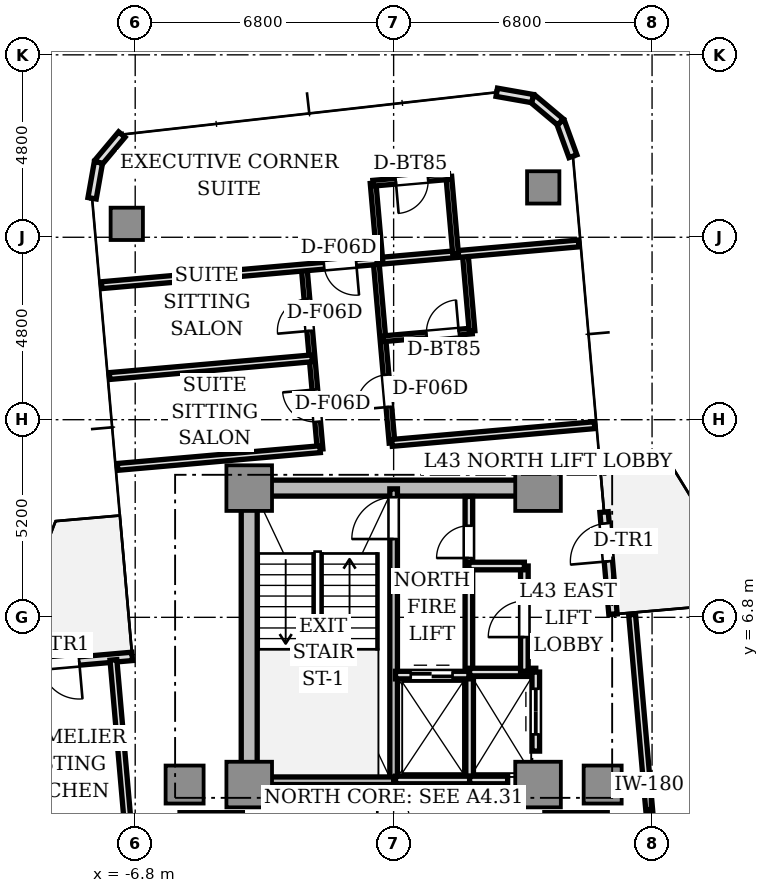
"""IFC4 building model, lengths in metres.
Left out: names, types, materials, properties, quantities, classifications, styles, units other than length and angle.
Written with IfcOpenShell. Run it as: python <this file> out.ifc"""

import sys

from ifc_helpers import new_model, si_unit, direction, frame, frame_2d, origin, origin_2d, place, context, subcontext, project, spatial, rectangle, extrude, source, transform, mapped, element, fill, save


model = new_model("IFC4")
c1 = context("Model", 3, precision=1e-05, world=origin(), true_north=direction((0.0, 1.0)))
c2 = subcontext(c1, "Body", "Model", "MODEL_VIEW")
j1 = project(units=[si_unit("LENGTHUNIT", "METRE"), si_unit("PLANEANGLEUNIT", "RADIAN")], contexts=[c1])
p1 = place(None, origin())
s1 = spatial("IfcSite", under=j1, at=p1, CompositionType="ELEMENT")
p2 = place(p1, origin())
s2 = spatial("IfcBuilding", under=s1, at=p2, CompositionType="ELEMENT")
p3 = place(p2, frame((0.0, 0.0, 157.3)))
s3 = spatial("IfcBuildingStorey", under=s2, at=p3, CompositionType="ELEMENT", Elevation=157.3)
p4 = place(p3, frame((-3.55, 10.2, 0.0), z_axis=(0.0, 0.0, 1.0), x_axis=(1.0, 0.0, 0.0)))
e1 = element("IfcWall", 1, at=p4, inside=s3, PredefinedType="SHEAR", context=c2, shape_type="SweptSolid", body=[
    extrude(rectangle(XDim=7.1, YDim=0.42, at=frame_2d((3.55, 0.0))), origin(), (0.0, 0.0, 1.0), 3.11),
])
p5 = place(p3, frame((-3.8, 2.85, 0.0), z_axis=(0.0, 0.0, 1.0), x_axis=(0.0, 1.0, 0.0)))
e2 = element("IfcWall", 2, at=p5, inside=s3, PredefinedType="SHEAR", context=c2, shape_type="SweptSolid", body=[
    extrude(rectangle(XDim=6.9, YDim=0.42, at=frame_2d((3.45, 0.0))), origin(), (0.0, 0.0, 1.0), 3.11),
])
m1 = source(origin(), c2, "Body", "SweptSolid", [
    extrude(rectangle(XDim=1.2, YDim=1.2, at=origin_2d()), origin(), (0.0, 0.0, 1.0), 3.11),
])
for number, where, z_axis, x_axis in (
    (3, (-3.8, 2.4, 0.0), (0.0, 0.0, 1.0), (1.0, 0.0, 0.0)),
    (4, (3.8, 2.4, 0.0), (0.0, 0.0, 1.0), (1.0, 0.0, 0.0)),
    (5, (-3.8, 10.2, 0.0), (0.0, 0.0, 1.0), (1.0, 0.0, 0.0)),
    (6, (3.8, 10.2, 0.0), (0.0, 0.0, 1.0), (1.0, 0.0, 0.0)),
):
    element("IfcColumn", number, at=place(p3, frame(where, z_axis=z_axis, x_axis=x_axis)), inside=s3, PredefinedType="COLUMN", context=c2, shape_type="MappedRepresentation", body=[
        mapped(m1, transform((0.0, 0.0, 0.0), scale=1.0)),
    ])
m2 = source(origin(), c2, "Body", "SweptSolid", [
    extrude(rectangle(XDim=1.0, YDim=1.0, at=origin_2d()), origin(), (0.0, 0.0, 1.0), 3.11),
])
for number, where, z_axis, x_axis in (
    (7, (5.5, 2.4, 0.0), (0.0, 0.0, 1.0), (1.0, 0.0, 0.0)),
    (8, (-5.5, 2.4, 0.0), (0.0, 0.0, 1.0), (1.0, 0.0, 0.0)),
):
    element("IfcColumn", number, at=place(p3, frame(where, z_axis=z_axis, x_axis=x_axis)), inside=s3, PredefinedType="COLUMN", context=c2, shape_type="MappedRepresentation", body=[
        mapped(m2, transform((0.0, 0.0, 0.0), scale=1.0)),
    ])
m3 = source(origin(), c2, "Body", "SweptSolid", [
    extrude(rectangle(XDim=0.85, YDim=0.85, at=origin_2d()), origin(), (0.0, 0.0, 1.0), 3.11),
])
for number, where, z_axis, x_axis in (
    (9, (3.936, 18.112, 0.0), (0.0, 0.0, 1.0), (1.0, 0.0, 0.0)),
    (10, (-7.022, 17.153, 0.0), (0.0, 0.0, 1.0), (1.0, 0.0, 0.0)),
):
    element("IfcColumn", number, at=place(p3, frame(where, z_axis=z_axis, x_axis=x_axis)), inside=s3, PredefinedType="COLUMN", context=c2, shape_type="MappedRepresentation", body=[
        mapped(m3, transform((0.0, 0.0, 0.0), scale=1.0)),
    ])
p6 = place(p3, frame((5.772, 6.879, 0.0), z_axis=(0.0, 0.0, 1.0), x_axis=(-0.087168071984, 0.996193619346, 0.0)))
e11 = element("IfcWall", 11, at=p6, inside=s3, PredefinedType="STANDARD", context=c2, shape_type="SweptSolid", body=[
    extrude(rectangle(XDim=2.7, YDim=0.22, at=frame_2d((1.35, 0.0))), origin(), (0.0, 0.0, 1.0), 3.11),
])
p7 = place(p6, frame((1.4, 0.0, 0.0)))
e12 = element("IfcOpeningElement", 12, at=p7, cuts=e11, PredefinedType="OPENING", context=c2, shape_type="SweptSolid", body=[
    extrude(rectangle(XDim=1.0, YDim=2.2, at=frame_2d((0.5, 1.1))), frame((0.0, 0.12, 0.0), z_axis=(0.0, -1.0, 0.0), x_axis=(1.0, 0.0, 0.0)), (0.0, 0.0, 1.0), 0.24),
])
p8 = place(p3, frame((4.718, 18.933, 0.0), z_axis=(0.0, 0.0, 1.0), x_axis=(-0.34188635151, 0.939741306239, 0.0)))
e13 = element("IfcWall", 13, at=p8, inside=s3, PredefinedType="STANDARD", context=c2, shape_type="SweptSolid", body=[
    extrude(rectangle(XDim=0.958, YDim=0.22, at=frame_2d((0.479, 0.0))), origin(), (0.0, 0.0, 1.0), 3.11),
])
for number, where, z_axis, x_axis in (
    (14, (4.39, 19.833, 0.0), (0.0, 0.0, 1.0), (-0.766, 0.643, 0.0)),
    (15, (3.657, 20.449, 0.0), (0.0, 0.0, 1.0), (-0.985, 0.174, 0.0)),
):
    element("IfcWall", number, at=place(p3, frame(where, z_axis=z_axis, x_axis=x_axis)), inside=s3, PredefinedType="STANDARD", context=c2, shape_type="SweptSolid", body=[
        extrude(rectangle(XDim=0.958, YDim=0.22, at=frame_2d((0.479, 0.0))), origin(), (0.0, 0.0, 1.0), 3.11),
    ])
for number, where, z_axis, x_axis in (
    (16, (-7.152, 19.503, 0.0), (0.0, 0.0, 1.0), (-0.643, -0.766, 0.0)),
    (17, (-7.768, 18.769, 0.0), (0.0, 0.0, 1.0), (-0.174, -0.985, 0.0)),
):
    element("IfcWall", number, at=place(p3, frame(where, z_axis=z_axis, x_axis=x_axis)), inside=s3, PredefinedType="STANDARD", context=c2, shape_type="SweptSolid", body=[
        extrude(rectangle(XDim=0.958, YDim=0.22, at=frame_2d((0.479, 0.0))), origin(), (0.0, 0.0, 1.0), 3.11),
    ])
p9 = place(p3, frame((-6.879, 5.772, 0.0), z_axis=(0.0, 0.0, 1.0), x_axis=(-0.996193619346, -0.087168071984, 0.0)))
e18 = element("IfcWall", 18, at=p9, inside=s3, PredefinedType="STANDARD", context=c2, shape_type="SweptSolid", body=[
    extrude(rectangle(XDim=2.7, YDim=0.22, at=frame_2d((1.35, 0.0))), origin(), (0.0, 0.0, 1.0), 3.11),
])
p10 = place(p9, frame((1.4, 0.0, 0.0)))
e19 = element("IfcOpeningElement", 19, at=p10, cuts=e18, PredefinedType="OPENING", context=c2, shape_type="SweptSolid", body=[
    extrude(rectangle(XDim=1.0, YDim=2.2, at=frame_2d((0.5, 1.1))), frame((0.0, 0.12, 0.0), z_axis=(0.0, -1.0, 0.0), x_axis=(1.0, 0.0, 0.0)), (0.0, 0.0, 1.0), 0.24),
])
p11 = place(p3, frame((0.0, 2.5, 0.0), z_axis=(0.0, 0.0, 1.0), x_axis=(0.0, 1.0, 0.0)))
e20 = element("IfcWall", 20, at=p11, inside=s3, PredefinedType="SOLIDWALL", context=c2, shape_type="SweptSolid", body=[
    extrude(rectangle(XDim=7.68, YDim=0.2, at=frame_2d((3.84, 0.0))), origin(), (0.0, 0.0, 1.0), 3.11),
])
p12 = place(p11, frame((6.36, 0.0, 0.0)))
e21 = element("IfcOpeningElement", 21, at=p12, cuts=e20, PredefinedType="OPENING", context=c2, shape_type="SweptSolid", body=[
    extrude(rectangle(XDim=1.1, YDim=2.15, at=frame_2d((0.55, 1.075))), frame((0.0, 0.11, 0.0), z_axis=(0.0, -1.0, 0.0), x_axis=(1.0, 0.0, 0.0)), (0.0, 0.0, 1.0), 0.22),
])
p13 = place(p3, frame((-3.72, 2.5, 0.0), z_axis=(0.0, 0.0, 1.0), x_axis=(1.0, 0.0, 0.0)))
e22 = element("IfcWall", 22, at=p13, inside=s3, PredefinedType="SOLIDWALL", context=c2, shape_type="SweptSolid", body=[
    extrude(rectangle(XDim=3.72, YDim=0.2, at=frame_2d((1.86, 0.0))), origin(), (0.0, 0.0, 1.0), 3.11),
])
p14 = place(p3, frame((1.98, 5.32, 0.0), z_axis=(0.0, 0.0, 1.0), x_axis=(0.0, 1.0, 0.0)))
e23 = element("IfcWall", 23, at=p14, inside=s3, PredefinedType="SOLIDWALL", context=c2, shape_type="SweptSolid", body=[
    extrude(rectangle(XDim=4.66, YDim=0.2, at=frame_2d((2.33, 0.0))), origin(), (0.0, 0.0, 1.0), 2.66),
])
p15 = place(p14, frame((3.04, 0.0, 0.0)))
e24 = element("IfcOpeningElement", 24, at=p15, cuts=e23, PredefinedType="OPENING", context=c2, shape_type="SweptSolid", body=[
    extrude(rectangle(XDim=0.85, YDim=2.1, at=frame_2d((0.425, 1.05))), frame((0.0, 0.11, 0.0), z_axis=(0.0, -1.0, 0.0), x_axis=(1.0, 0.0, 0.0)), (0.0, 0.0, 1.0), 0.22),
])
p16 = place(p3, frame((2.0, 2.5, 0.0), z_axis=(0.0, 0.0, 1.0), x_axis=(0.0, 1.0, 0.0)))
e25 = element("IfcWall", 25, at=p16, inside=s3, PredefinedType="SOLIDWALL", context=c2, shape_type="SweptSolid", body=[
    extrude(rectangle(XDim=2.78, YDim=0.2, at=frame_2d((1.39, 0.0))), origin(), (0.0, 0.0, 1.0), 2.66),
])
p17 = place(p3, frame((0.05, 2.52, 0.0), z_axis=(0.0, 0.0, 1.0), x_axis=(1.0, 0.0, 0.0)))
e26 = element("IfcWall", 26, at=p17, inside=s3, PredefinedType="SOLIDWALL", context=c2, shape_type="SweptSolid", body=[
    extrude(rectangle(XDim=1.95, YDim=0.2, at=frame_2d((0.975, 0.0))), origin(), (0.0, 0.0, 1.0), 2.66),
])
p18 = place(p3, frame((0.05, 5.28, 0.0), z_axis=(0.0, 0.0, 1.0), x_axis=(1.0, 0.0, 0.0)))
e27 = element("IfcWall", 27, at=p18, inside=s3, PredefinedType="SOLIDWALL", context=c2, shape_type="SweptSolid", body=[
    extrude(rectangle(XDim=1.93, YDim=0.2, at=frame_2d((0.965, 0.0))), origin(), (0.0, 0.0, 1.0), 2.66),
])
p19 = place(p18, frame((0.4, 0.0, 0.0)))
e28 = element("IfcOpeningElement", 28, at=p19, cuts=e27, PredefinedType="OPENING", context=c2, shape_type="SweptSolid", body=[
    extrude(rectangle(XDim=1.1, YDim=2.2, at=frame_2d((0.55, 1.1))), frame((0.0, 0.11, 0.0), z_axis=(0.0, -1.0, 0.0), x_axis=(1.0, 0.0, 0.0)), (0.0, 0.0, 1.0), 0.22),
])
p20 = place(p3, frame((2.0, 2.52, 0.0), z_axis=(0.0, 0.0, 1.0), x_axis=(1.0, 0.0, 0.0)))
e29 = element("IfcWall", 29, at=p20, inside=s3, PredefinedType="SOLIDWALL", context=c2, shape_type="SweptSolid", body=[
    extrude(rectangle(XDim=1.0, YDim=0.2, at=frame_2d((0.5, 0.0))), origin(), (0.0, 0.0, 1.0), 2.66),
])
p21 = place(p3, frame((2.0, 5.36, 0.0), z_axis=(0.0, 0.0, 1.0), x_axis=(1.0, 0.0, 0.0)))
e30 = element("IfcWall", 30, at=p21, inside=s3, PredefinedType="SOLIDWALL", context=c2, shape_type="SweptSolid", body=[
    extrude(rectangle(XDim=1.74, YDim=0.2, at=frame_2d((0.87, 0.0))), origin(), (0.0, 0.0, 1.0), 2.66),
])
p22 = place(p3, frame((3.74, 3.28, 0.0), z_axis=(0.0, 0.0, 1.0), x_axis=(0.0, 1.0, 0.0)))
e31 = element("IfcWall", 31, at=p22, inside=s3, PredefinedType="SOLIDWALL", context=c2, shape_type="SweptSolid", body=[
    extrude(rectangle(XDim=2.08, YDim=0.2, at=frame_2d((1.04, 0.0))), origin(), (0.0, 0.0, 1.0), 2.66),
])
p23 = place(p22, frame((0.44, 0.0, 0.0)))
e32 = element("IfcOpeningElement", 32, at=p23, cuts=e31, PredefinedType="OPENING", context=c2, shape_type="SweptSolid", body=[
    extrude(rectangle(XDim=1.2, YDim=2.2, at=frame_2d((0.6, 1.1))), frame((0.0, 0.11, 0.0), z_axis=(0.0, -1.0, 0.0), x_axis=(1.0, 0.0, 0.0)), (0.0, 0.0, 1.0), 0.22),
])
for number, where, z_axis, x_axis in (
    (33, (3.98, 1.56, 0.0), (0.0, 0.0, 1.0), (1.0, 0.0, 0.0)),
    (34, (-5.62, 1.56, 0.0), (0.0, 0.0, 1.0), (1.0, 0.0, 0.0)),
):
    element("IfcWall", number, at=place(p3, frame(where, z_axis=z_axis, x_axis=x_axis)), inside=s3, PredefinedType="SOLIDWALL", context=c2, shape_type="SweptSolid", body=[
        extrude(rectangle(XDim=1.64, YDim=0.2, at=frame_2d((0.82, 0.0))), origin(), (0.0, 0.0, 1.0), 2.66),
    ])
p24 = place(p3, frame((3.44, 5.38, 0.0), z_axis=(0.0, 0.0, 1.0), x_axis=(0.0, 1.0, 0.0)))
e35 = element("IfcWall", 35, at=p24, inside=s3, PredefinedType="SOLIDWALL", context=c2, shape_type="SweptSolid", body=[
    extrude(rectangle(XDim=2.77, YDim=0.2, at=frame_2d((1.385, 0.0))), origin(), (0.0, 0.0, 1.0), 2.66),
])
p25 = place(p24, frame((0.9, 0.0, 0.0)))
e36 = element("IfcOpeningElement", 36, at=p25, cuts=e35, PredefinedType="OPENING", context=c2, shape_type="SweptSolid", body=[
    extrude(rectangle(XDim=0.95, YDim=2.15, at=frame_2d((0.475, 1.075))), frame((0.0, 0.11, 0.0), z_axis=(0.0, -1.0, 0.0), x_axis=(1.0, 0.0, 0.0)), (0.0, 0.0, 1.0), 0.22),
])
p26 = place(p3, frame((1.98, 8.15, 0.0), z_axis=(0.0, 0.0, 1.0), x_axis=(1.0, 0.0, 0.0)))
e37 = element("IfcWall", 37, at=p26, inside=s3, PredefinedType="SOLIDWALL", context=c2, shape_type="SweptSolid", body=[
    extrude(rectangle(XDim=1.46, YDim=0.2, at=frame_2d((0.73, 0.0))), origin(), (0.0, 0.0, 1.0), 2.66),
])
p27 = place(p3, frame((7.181, -3.487, 0.0), z_axis=(0.0, 0.0, 1.0), x_axis=(-0.087163455754, 0.996194023261, 0.0)))
e38 = element("IfcWall", 38, at=p27, inside=s3, PredefinedType="PARTITIONING", context=c2, shape_type="SweptSolid", body=[
    extrude(rectangle(XDim=10.4, YDim=0.18, at=frame_2d((5.2, 0.0))), origin(), (0.0, 0.0, 1.0), 2.66),
])
p28 = place(p3, frame((-1.936, 11.224, 0.0), z_axis=(0.0, 0.0, 1.0), x_axis=(-0.087182724829, 0.996192337097, 0.0)))
e39 = element("IfcWall", 39, at=p28, inside=s3, PredefinedType="PARTITIONING", context=c2, shape_type="SweptSolid", body=[
    extrude(rectangle(XDim=4.8, YDim=0.15, at=frame_2d((2.4, 0.0))), origin(), (0.0, 0.0, 1.0), 2.66),
])
p29 = place(p28, frame((0.725, 0.0, 0.0)))
e40 = element("IfcOpeningElement", 40, at=p29, cuts=e39, PredefinedType="OPENING", context=c2, shape_type="SweptSolid", body=[
    extrude(rectangle(XDim=0.85, YDim=2.1, at=frame_2d((0.425, 1.05))), frame((0.0, 0.085, 0.0), z_axis=(0.0, -1.0, 0.0), x_axis=(1.0, 0.0, 0.0)), (0.0, 0.0, 1.0), 0.17),
])
p30 = place(p28, frame((3.125, 0.0, 0.0)))
e41 = element("IfcOpeningElement", 41, at=p30, cuts=e39, PredefinedType="OPENING", context=c2, shape_type="SweptSolid", body=[
    extrude(rectangle(XDim=0.85, YDim=2.1, at=frame_2d((0.425, 1.05))), frame((0.0, 0.085, 0.0), z_axis=(0.0, -1.0, 0.0), x_axis=(1.0, 0.0, 0.0)), (0.0, 0.0, 1.0), 0.17),
])
p31 = place(p3, frame((-0.043, 11.39, 0.0), z_axis=(0.0, 0.0, 1.0), x_axis=(-0.087178307383, 0.996192723684, 0.0)))
e42 = element("IfcWall", 42, at=p31, inside=s3, PredefinedType="PARTITIONING", context=c2, shape_type="SweptSolid", body=[
    extrude(rectangle(XDim=4.8, YDim=0.15, at=frame_2d((2.4, 0.0))), origin(), (0.0, 0.0, 1.0), 2.66),
])
p32 = place(p31, frame((0.95, 0.0, 0.0)))
e43 = element("IfcOpeningElement", 43, at=p32, cuts=e42, PredefinedType="OPENING", context=c2, shape_type="SweptSolid", body=[
    extrude(rectangle(XDim=0.85, YDim=2.1, at=frame_2d((0.425, 1.05))), frame((0.0, 0.085, 0.0), z_axis=(0.0, -1.0, 0.0), x_axis=(1.0, 0.0, 0.0)), (0.0, 0.0, 1.0), 0.17),
])
for number, where, z_axis, x_axis in (
    (44, (-1.936, 11.224, 0.0), (0.0, 0.0, 1.0), (-0.996, -0.087, 0.0)),
    (45, (5.287, 11.856, 0.0), (0.0, 0.0, 1.0), (-0.996, -0.087, 0.0)),
    (46, (-2.145, 13.615, 0.0), (0.0, 0.0, 1.0), (-0.996, -0.087, 0.0)),
):
    element("IfcWall", number, at=place(p3, frame(where, z_axis=z_axis, x_axis=x_axis)), inside=s3, PredefinedType="PARTITIONING", context=c2, shape_type="SweptSolid", body=[
        extrude(rectangle(XDim=5.35, YDim=0.18, at=frame_2d((2.675, 0.0))), origin(), (0.0, 0.0, 1.0), 2.66),
    ])
p33 = place(p3, frame((-0.282, 14.129, 0.0), z_axis=(0.0, 0.0, 1.0), x_axis=(0.996197656711, 0.087121918963, 0.0)))
e47 = element("IfcWall", 47, at=p33, inside=s3, PredefinedType="PARTITIONING", context=c2, shape_type="SweptSolid", body=[
    extrude(rectangle(XDim=2.354, YDim=0.15, at=frame_2d((1.177, 0.0))), origin(), (0.0, 0.0, 1.0), 2.66),
])
p34 = place(p33, frame((1.154, 0.0, 0.0)))
e48 = element("IfcOpeningElement", 48, at=p34, cuts=e47, PredefinedType="OPENING", context=c2, shape_type="SweptSolid", body=[
    extrude(rectangle(XDim=0.85, YDim=2.1, at=frame_2d((0.425, 1.05))), frame((0.0, 0.085, 0.0), z_axis=(0.0, -1.0, 0.0), x_axis=(1.0, 0.0, 0.0)), (0.0, 0.0, 1.0), 0.17),
])
p35 = place(p3, frame((2.062, 14.334, 0.0), z_axis=(0.0, 0.0, 1.0), x_axis=(-0.087174336889, 0.99619307114, 0.0)))
e49 = element("IfcWall", 49, at=p35, inside=s3, PredefinedType="PARTITIONING", context=c2, shape_type="SweptSolid", body=[
    extrude(rectangle(XDim=2.05, YDim=0.15, at=frame_2d((1.025, 0.0))), origin(), (0.0, 0.0, 1.0), 2.66),
])
p36 = place(p3, frame((4.868, 16.638, 0.0), z_axis=(0.0, 0.0, 1.0), x_axis=(-0.996194790044, -0.087154691724, 0.0)))
e50 = element("IfcWall", 50, at=p36, inside=s3, PredefinedType="PARTITIONING", context=c2, shape_type="SweptSolid", body=[
    extrude(rectangle(XDim=12.6, YDim=0.18, at=frame_2d((6.3, 0.0))), origin(), (0.0, 0.0, 1.0), 2.66),
])
p37 = place(p36, frame((5.875, 0.0, 0.0)))
e51 = element("IfcOpeningElement", 51, at=p37, cuts=e50, PredefinedType="OPENING", context=c2, shape_type="SweptSolid", body=[
    extrude(rectangle(XDim=0.85, YDim=2.1, at=frame_2d((0.425, 1.05))), frame((0.0, 0.1, 0.0), z_axis=(0.0, -1.0, 0.0), x_axis=(1.0, 0.0, 0.0)), (0.0, 0.0, 1.0), 0.2),
])
p38 = place(p3, frame((-0.362, 16.18, 0.0), z_axis=(0.0, 0.0, 1.0), x_axis=(-0.087174336889, 0.99619307114, 0.0)))
e52 = element("IfcWall", 52, at=p38, inside=s3, PredefinedType="PARTITIONING", context=c2, shape_type="SweptSolid", body=[
    extrude(rectangle(XDim=2.05, YDim=0.15, at=frame_2d((1.025, 0.0))), origin(), (0.0, 0.0, 1.0), 2.66),
])
p39 = place(p3, frame((1.631, 16.354, 0.0), z_axis=(0.0, 0.0, 1.0), x_axis=(-0.087184680235, 0.996192165966, 0.0)))
e53 = element("IfcWall", 53, at=p39, inside=s3, PredefinedType="PARTITIONING", context=c2, shape_type="SweptSolid", body=[
    extrude(rectangle(XDim=2.05, YDim=0.15, at=frame_2d((1.025, 0.0))), origin(), (0.0, 0.0, 1.0), 2.66),
])
p40 = place(p3, frame((1.452, 18.396, 0.0), z_axis=(0.0, 0.0, 1.0), x_axis=(-0.996205236158, -0.087035208109, 0.0)))
e54 = element("IfcWall", 54, at=p40, inside=s3, PredefinedType="PARTITIONING", context=c2, shape_type="SweptSolid", body=[
    extrude(rectangle(XDim=2.0, YDim=0.15, at=frame_2d((1.0, 0.0))), origin(), (0.0, 0.0, 1.0), 2.66),
])
p41 = place(p40, frame((0.55, 0.0, 0.0)))
e55 = element("IfcOpeningElement", 55, at=p41, cuts=e54, PredefinedType="OPENING", context=c2, shape_type="SweptSolid", body=[
    extrude(rectangle(XDim=0.85, YDim=2.1, at=frame_2d((0.425, 1.05))), frame((0.0, 0.085, 0.0), z_axis=(0.0, -1.0, 0.0), x_axis=(1.0, 0.0, 0.0)), (0.0, 0.0, 1.0), 0.17),
])
p42 = place(p3, frame((-7.373, 5.679, 0.0), z_axis=(0.0, 0.0, 1.0), x_axis=(0.087161289348, -0.996194212812, 0.0)))
e56 = element("IfcWall", 56, at=p42, inside=s3, PredefinedType="PARTITIONING", context=c2, shape_type="SweptSolid", body=[
    extrude(rectangle(XDim=5.35, YDim=0.18, at=frame_2d((2.675, 0.0))), origin(), (0.0, 0.0, 1.0), 2.66),
])
m4 = source(origin(), c2, "Body", "SweptSolid", [
    extrude(rectangle(XDim=1.0, YDim=0.05, at=origin_2d()), origin(), (0.0, 0.0, 1.0), 2.2),
])
p43 = place(p7, frame((0.5, 0.0, 0.0)))
e57 = element("IfcDoor", 57, at=p43, inside=s3, OperationType="SINGLE_SWING_LEFT", PredefinedType="DOOR", context=c2, shape_type="MappedRepresentation", body=[
    mapped(m4, transform((0.0, 0.0, 0.0), scale=1.0)),
])
fill(e12, e57)
p44 = place(p10, frame((0.5, 0.0, 0.0)))
e58 = element("IfcDoor", 58, at=p44, inside=s3, OperationType="SINGLE_SWING_LEFT", PredefinedType="DOOR", context=c2, shape_type="MappedRepresentation", body=[
    mapped(m4, transform((0.0, 0.0, 0.0), scale=1.0)),
])
fill(e19, e58)
m5 = source(origin(), c2, "Body", "SweptSolid", [
    extrude(rectangle(XDim=1.1, YDim=0.05, at=origin_2d()), origin(), (0.0, 0.0, 1.0), 2.15),
])
p45 = place(p12, frame((0.55, 0.0, 0.0)))
e59 = element("IfcDoor", 59, at=p45, inside=s3, OperationType="SINGLE_SWING_LEFT", PredefinedType="DOOR", context=c2, shape_type="MappedRepresentation", body=[
    mapped(m5, transform((0.0, 0.0, 0.0), scale=1.0)),
])
fill(e21, e59)
m6 = source(origin(), c2, "Body", "SweptSolid", [
    extrude(rectangle(XDim=0.85, YDim=0.05, at=origin_2d()), origin(), (0.0, 0.0, 1.0), 2.1),
])
p46 = place(p15, frame((0.425, 0.0, 0.0)))
e60 = element("IfcDoor", 60, at=p46, inside=s3, OperationType="SINGLE_SWING_LEFT", PredefinedType="DOOR", context=c2, shape_type="MappedRepresentation", body=[
    mapped(m6, transform((0.0, 0.0, 0.0), scale=1.0)),
])
fill(e24, e60)
m7 = source(origin(), c2, "Body", "SweptSolid", [
    extrude(rectangle(XDim=1.1, YDim=0.05, at=origin_2d()), origin(), (0.0, 0.0, 1.0), 2.2),
])
p47 = place(p19, frame((0.55, 0.0, 0.0)))
e61 = element("IfcDoor", 61, at=p47, inside=s3, OperationType="DOUBLE_DOOR_SLIDING", PredefinedType="DOOR", context=c2, shape_type="MappedRepresentation", body=[
    mapped(m7, transform((0.0, 0.0, 0.0), scale=1.0)),
])
fill(e28, e61)
m8 = source(origin(), c2, "Body", "SweptSolid", [
    extrude(rectangle(XDim=1.2, YDim=0.05, at=origin_2d()), origin(), (0.0, 0.0, 1.0), 2.2),
])
p48 = place(p23, frame((0.6, 0.0, 0.0)))
e62 = element("IfcDoor", 62, at=p48, inside=s3, OperationType="DOUBLE_DOOR_SLIDING", PredefinedType="DOOR", context=c2, shape_type="MappedRepresentation", body=[
    mapped(m8, transform((0.0, 0.0, 0.0), scale=1.0)),
])
fill(e32, e62)
m9 = source(origin(), c2, "Body", "SweptSolid", [
    extrude(rectangle(XDim=0.95, YDim=0.05, at=origin_2d()), origin(), (0.0, 0.0, 1.0), 2.15),
])
p49 = place(p25, frame((0.475, 0.0, 0.0)))
e63 = element("IfcDoor", 63, at=p49, inside=s3, OperationType="SINGLE_SWING_LEFT", PredefinedType="DOOR", context=c2, shape_type="MappedRepresentation", body=[
    mapped(m9, transform((0.0, 0.0, 0.0), scale=1.0)),
])
fill(e36, e63)
p50 = place(p29, frame((0.425, 0.0, 0.0)))
e64 = element("IfcDoor", 64, at=p50, inside=s3, OperationType="SINGLE_SWING_RIGHT", PredefinedType="DOOR", context=c2, shape_type="MappedRepresentation", body=[
    mapped(m6, transform((0.0, 0.0, 0.0), scale=1.0)),
])
fill(e40, e64)
p51 = place(p30, frame((0.425, 0.0, 0.0)))
e65 = element("IfcDoor", 65, at=p51, inside=s3, OperationType="SINGLE_SWING_LEFT", PredefinedType="DOOR", context=c2, shape_type="MappedRepresentation", body=[
    mapped(m6, transform((0.0, 0.0, 0.0), scale=1.0)),
])
fill(e41, e65)
p52 = place(p34, frame((0.425, 0.0, 0.0)))
e66 = element("IfcDoor", 66, at=p52, inside=s3, OperationType="SINGLE_SWING_RIGHT", PredefinedType="DOOR", context=c2, shape_type="MappedRepresentation", body=[
    mapped(m6, transform((0.0, 0.0, 0.0), scale=1.0)),
])
fill(e48, e66)
p53 = place(p32, frame((0.425, 0.0, 0.0)))
e67 = element("IfcDoor", 67, at=p53, inside=s3, OperationType="SINGLE_SWING_LEFT", PredefinedType="DOOR", context=c2, shape_type="MappedRepresentation", body=[
    mapped(m6, transform((0.0, 0.0, 0.0), scale=1.0)),
])
fill(e43, e67)
p54 = place(p41, frame((0.425, 0.0, 0.0)))
e68 = element("IfcDoor", 68, at=p54, inside=s3, OperationType="SINGLE_SWING_RIGHT", PredefinedType="DOOR", context=c2, shape_type="MappedRepresentation", body=[
    mapped(m6, transform((0.0, 0.0, 0.0), scale=1.0)),
])
fill(e55, e68)
p55 = place(p37, frame((0.425, 0.0, 0.0)))
e69 = element("IfcDoor", 69, at=p55, inside=s3, OperationType="SINGLE_SWING_LEFT", PredefinedType="DOOR", context=c2, shape_type="MappedRepresentation", body=[
    mapped(m6, transform((0.0, 0.0, 0.0), scale=1.0)),
])
fill(e51, e69)
save(model, sys.argv[1])
